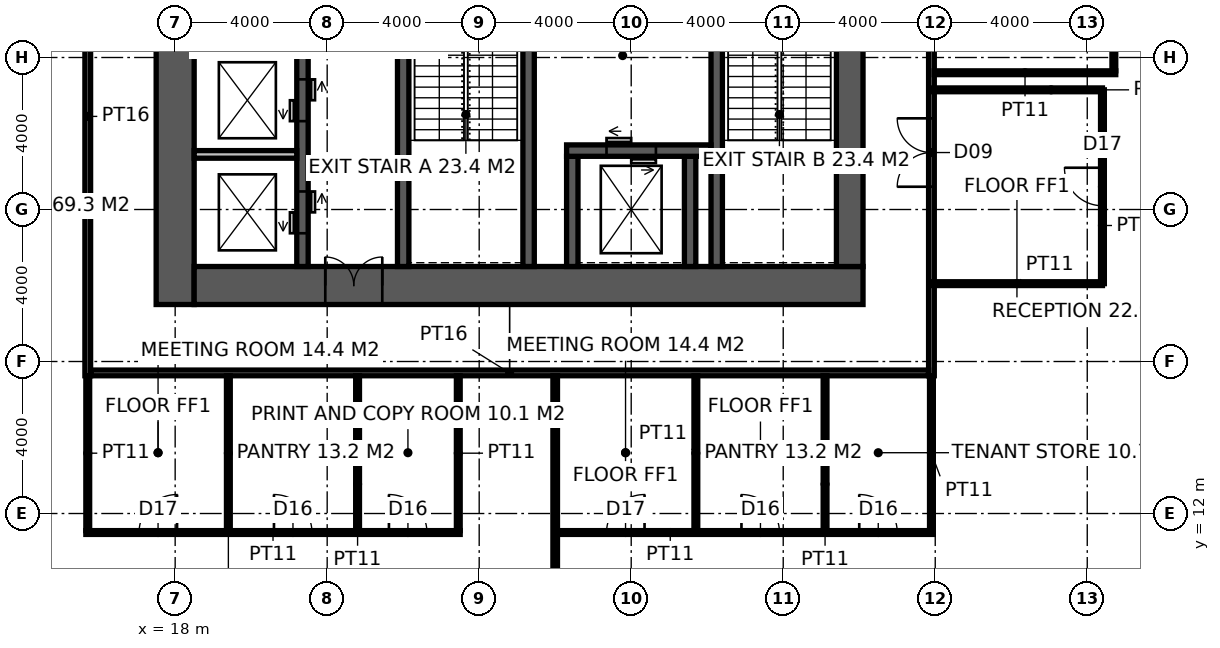
"""IFC4 building model, lengths in metres.
Left out: names, types, materials, properties, quantities, classifications, styles, units other than length and angle.
Written with IfcOpenShell. Run it as: python <this file> out.ifc"""

import sys

from ifc_helpers import new_model, si_unit, direction, frame, frame_2d, origin, place, context, subcontext, project, spatial, rectangle, extrude, element, fill, save


model = new_model("IFC4")
c1 = context("Model", 3, precision=1e-05, world=origin(), true_north=direction((0.0, 1.0)))
c2 = subcontext(c1, "Body", "Model", "MODEL_VIEW")
j1 = project(units=[si_unit("LENGTHUNIT", "METRE"), si_unit("PLANEANGLEUNIT", "RADIAN")], contexts=[c1])
p1 = place(None, origin())
s1 = spatial("IfcSite", under=j1, at=p1, CompositionType="ELEMENT")
p2 = place(p1, origin())
s2 = spatial("IfcBuilding", under=s1, at=p2, CompositionType="ELEMENT")
p3 = place(p2, frame((0.0, 0.0, 101.4)))
s3 = spatial("IfcBuildingStorey", under=s2, at=p3, CompositionType="ELEMENT", Elevation=101.4)
p4 = place(p3, frame((18.0, 17.5, -0.15), z_axis=(0.0, 0.0, 1.0), x_axis=(0.0, 1.0, 0.0)))
e1 = element("IfcWall", 1, at=p4, inside=s3, PredefinedType="SHEAR", context=c2, shape_type="SweptSolid", body=[
    extrude(rectangle(XDim=19.0, YDim=1.0, at=frame_2d((9.5, 0.0))), origin(), (0.0, 0.0, 1.0), 4.0),
])
p5 = place(p3, frame((18.5, 18.0, -0.15), z_axis=(0.0, 0.0, 1.0), x_axis=(1.0, 0.0, 0.0)))
e2 = element("IfcWall", 2, at=p5, inside=s3, PredefinedType="SHEAR", context=c2, shape_type="SweptSolid", body=[
    extrude(rectangle(XDim=17.6, YDim=1.0, at=frame_2d((8.8, 0.0))), origin(), (0.0, 0.0, 1.0), 4.0),
])
p6 = place(p5, frame((3.45, 0.0, 0.15)))
e3 = element("IfcOpeningElement", 3, at=p6, cuts=e2, PredefinedType="OPENING", context=c2, shape_type="SweptSolid", body=[
    extrude(rectangle(XDim=1.5, YDim=2.4, at=frame_2d((0.75, 1.2))), frame((0.0, 0.51, 0.0), z_axis=(0.0, -1.0, 0.0), x_axis=(1.0, 0.0, 0.0)), (0.0, 0.0, 1.0), 1.02),
])
p7 = place(p3, frame((35.75, 18.5, -0.15), z_axis=(0.0, 0.0, 1.0), x_axis=(0.0, 1.0, 0.0)))
e4 = element("IfcWall", 4, at=p7, inside=s3, PredefinedType="SHEAR", context=c2, shape_type="SweptSolid", body=[
    extrude(rectangle(XDim=17.0, YDim=0.7, at=frame_2d((8.5, 0.0))), origin(), (0.0, 0.0, 1.0), 4.0),
])
p8 = place(p7, frame((9.85, 0.0, 0.15)))
e5 = element("IfcOpeningElement", 5, at=p8, cuts=e4, PredefinedType="OPENING", context=c2, shape_type="SweptSolid", body=[
    extrude(rectangle(XDim=1.0, YDim=2.2, at=frame_2d((0.5, 1.1))), frame((0.0, 0.36, 0.0), z_axis=(0.0, -1.0, 0.0), x_axis=(1.0, 0.0, 0.0)), (0.0, 0.0, 1.0), 0.72),
])
p9 = place(p3, frame((24.0, 18.5, -0.15), z_axis=(0.0, 0.0, 1.0), x_axis=(0.0, 1.0, 0.0)))
e6 = element("IfcWall", 6, at=p9, inside=s3, PredefinedType="SHEAR", context=c2, shape_type="SweptSolid", body=[
    extrude(rectangle(XDim=17.0, YDim=0.3, at=frame_2d((8.5, 0.0))), origin(), (0.0, 0.0, 1.0), 4.0),
])
p10 = place(p9, frame((9.6, 0.0, 0.15)))
e7 = element("IfcOpeningElement", 7, at=p10, cuts=e6, PredefinedType="OPENING", context=c2, shape_type="SweptSolid", body=[
    extrude(rectangle(XDim=1.5, YDim=2.4, at=frame_2d((0.75, 1.2))), frame((0.0, 0.16, 0.0), z_axis=(0.0, -1.0, 0.0), x_axis=(1.0, 0.0, 0.0)), (0.0, 0.0, 1.0), 0.32),
])
p11 = place(p3, frame((27.3, 18.5, -0.15), z_axis=(0.0, 0.0, 1.0), x_axis=(0.0, 1.0, 0.0)))
e8 = element("IfcWall", 8, at=p11, inside=s3, PredefinedType="SHEAR", context=c2, shape_type="SweptSolid", body=[
    extrude(rectangle(XDim=7.9, YDim=0.3, at=frame_2d((3.95, 0.0))), origin(), (0.0, 0.0, 1.0), 4.0),
])
p12 = place(p11, frame((6.4, 0.0, 0.15)))
e9 = element("IfcOpeningElement", 9, at=p12, cuts=e8, PredefinedType="OPENING", context=c2, shape_type="SweptSolid", body=[
    extrude(rectangle(XDim=1.0, YDim=2.2, at=frame_2d((0.5, 1.1))), frame((0.0, 0.16, 0.0), z_axis=(0.0, -1.0, 0.0), x_axis=(1.0, 0.0, 0.0)), (0.0, 0.0, 1.0), 0.32),
])
p13 = place(p3, frame((32.25, 18.5, -0.15), z_axis=(0.0, 0.0, 1.0), x_axis=(0.0, 1.0, 0.0)))
e10 = element("IfcWall", 10, at=p13, inside=s3, PredefinedType="SHEAR", context=c2, shape_type="SweptSolid", body=[
    extrude(rectangle(XDim=7.9, YDim=0.3, at=frame_2d((3.95, 0.0))), origin(), (0.0, 0.0, 1.0), 4.0),
])
for number, where, z_axis, x_axis in (
    (11, (28.45, 18.5, -0.15), (0.0, 0.0, 1.0), (0.0, 1.0, 0.0)),
    (12, (31.55, 18.5, -0.15), (0.0, 0.0, 1.0), (0.0, 1.0, 0.0)),
):
    element("IfcWall", number, at=place(p3, frame(where, z_axis=z_axis, x_axis=x_axis)), inside=s3, PredefinedType="SHEAR", context=c2, shape_type="SweptSolid", body=[
        extrude(rectangle(XDim=2.9, YDim=0.3, at=frame_2d((1.45, 0.0))), origin(), (0.0, 0.0, 1.0), 4.0),
    ])
p14 = place(p3, frame((28.3, 21.55, -0.15), z_axis=(0.0, 0.0, 1.0), x_axis=(1.0, 0.0, 0.0)))
e13 = element("IfcWall", 13, at=p14, inside=s3, PredefinedType="SHEAR", context=c2, shape_type="SweptSolid", body=[
    extrude(rectangle(XDim=3.8, YDim=0.3, at=frame_2d((1.9, 0.0))), origin(), (0.0, 0.0, 1.0), 4.0),
])
p15 = place(p14, frame((1.05, 0.0, 0.15)))
e14 = element("IfcOpeningElement", 14, at=p15, cuts=e13, PredefinedType="OPENING", context=c2, shape_type="SweptSolid", body=[
    extrude(rectangle(XDim=1.3, YDim=2.4, at=frame_2d((0.65, 1.2))), frame((0.0, 0.16, 0.0), z_axis=(0.0, -1.0, 0.0), x_axis=(1.0, 0.0, 0.0)), (0.0, 0.0, 1.0), 0.32),
])
p16 = place(p3, frame((21.35, 18.5, -0.15), z_axis=(0.0, 0.0, 1.0), x_axis=(0.0, 1.0, 0.0)))
e15 = element("IfcWall", 15, at=p16, inside=s3, PredefinedType="SHEAR", context=c2, shape_type="SweptSolid", body=[
    extrude(rectangle(XDim=12.5, YDim=0.3, at=frame_2d((6.25, 0.0))), origin(), (0.0, 0.0, 1.0), 4.0),
])
p17 = place(p16, frame((0.875, 0.0, 0.15)))
e16 = element("IfcOpeningElement", 16, at=p17, cuts=e15, PredefinedType="OPENING", context=c2, shape_type="SweptSolid", body=[
    extrude(rectangle(XDim=1.1, YDim=2.2, at=frame_2d((0.55, 1.1))), frame((0.0, 0.16, 0.0), z_axis=(0.0, -1.0, 0.0), x_axis=(1.0, 0.0, 0.0)), (0.0, 0.0, 1.0), 0.32),
])
p18 = place(p16, frame((3.825, 0.0, 0.15)))
e17 = element("IfcOpeningElement", 17, at=p18, cuts=e15, PredefinedType="OPENING", context=c2, shape_type="SweptSolid", body=[
    extrude(rectangle(XDim=1.1, YDim=2.2, at=frame_2d((0.55, 1.1))), frame((0.0, 0.16, 0.0), z_axis=(0.0, -1.0, 0.0), x_axis=(1.0, 0.0, 0.0)), (0.0, 0.0, 1.0), 0.32),
])
p19 = place(p16, frame((6.675, 0.0, 0.15)))
e18 = element("IfcOpeningElement", 18, at=p19, cuts=e15, PredefinedType="OPENING", context=c2, shape_type="SweptSolid", body=[
    extrude(rectangle(XDim=1.1, YDim=2.2, at=frame_2d((0.55, 1.1))), frame((0.0, 0.16, 0.0), z_axis=(0.0, -1.0, 0.0), x_axis=(1.0, 0.0, 0.0)), (0.0, 0.0, 1.0), 0.32),
])
p20 = place(p16, frame((9.575, 0.0, 0.15)))
e19 = element("IfcOpeningElement", 19, at=p20, cuts=e15, PredefinedType="OPENING", context=c2, shape_type="SweptSolid", body=[
    extrude(rectangle(XDim=1.1, YDim=2.2, at=frame_2d((0.55, 1.1))), frame((0.0, 0.16, 0.0), z_axis=(0.0, -1.0, 0.0), x_axis=(1.0, 0.0, 0.0)), (0.0, 0.0, 1.0), 0.32),
])
p21 = place(p3, frame((18.5, 21.45, -0.15), z_axis=(0.0, 0.0, 1.0), x_axis=(1.0, 0.0, 0.0)))
e20 = element("IfcWall", 20, at=p21, inside=s3, PredefinedType="SOLIDWALL", context=c2, shape_type="SweptSolid", body=[
    extrude(rectangle(XDim=2.7, YDim=0.2, at=frame_2d((1.35, 0.0))), origin(), (0.0, 0.0, 1.0), 4.0),
])
p22 = place(p3, frame((15.7, 15.625, 0.0), z_axis=(0.0, 0.0, 1.0), x_axis=(0.0, 1.0, 0.0)))
e21 = element("IfcWall", 21, at=p22, inside=s3, PredefinedType="PARTITIONING", context=c2, shape_type="SweptSolid", body=[
    extrude(rectangle(XDim=22.75, YDim=0.15, at=frame_2d((11.375, 0.0))), origin(), (0.0, 0.0, 1.0), 3.85),
])
p23 = place(p22, frame((10.475, 0.0, 0.0)))
e22 = element("IfcOpeningElement", 22, at=p23, cuts=e21, PredefinedType="OPENING", context=c2, shape_type="SweptSolid", body=[
    extrude(rectangle(XDim=1.8, YDim=2.4, at=frame_2d((0.9, 1.2))), frame((0.0, 0.085, 0.0), z_axis=(0.0, -1.0, 0.0), x_axis=(1.0, 0.0, 0.0)), (0.0, 0.0, 1.0), 0.17),
])
p24 = place(p3, frame((37.9, 15.625, 0.0), z_axis=(0.0, 0.0, 1.0), x_axis=(0.0, 1.0, 0.0)))
e23 = element("IfcWall", 23, at=p24, inside=s3, PredefinedType="PARTITIONING", context=c2, shape_type="SweptSolid", body=[
    extrude(rectangle(XDim=22.75, YDim=0.15, at=frame_2d((11.375, 0.0))), origin(), (0.0, 0.0, 1.0), 2.65),
])
p25 = place(p24, frame((4.974, 0.0, 0.0)))
e24 = element("IfcOpeningElement", 24, at=p25, cuts=e23, PredefinedType="OPENING", context=c2, shape_type="SweptSolid", body=[
    extrude(rectangle(XDim=1.8, YDim=2.4, at=frame_2d((0.9, 1.2))), frame((0.0, 0.085, 0.0), z_axis=(0.0, -1.0, 0.0), x_axis=(1.0, 0.0, 0.0)), (0.0, 0.0, 1.0), 0.17),
])
p26 = place(p24, frame((16.226, 0.0, 0.0)))
e25 = element("IfcOpeningElement", 25, at=p26, cuts=e23, PredefinedType="OPENING", context=c2, shape_type="SweptSolid", body=[
    extrude(rectangle(XDim=1.8, YDim=2.4, at=frame_2d((0.9, 1.2))), frame((0.0, 0.085, 0.0), z_axis=(0.0, -1.0, 0.0), x_axis=(1.0, 0.0, 0.0)), (0.0, 0.0, 1.0), 0.17),
])
p27 = place(p3, frame((15.775, 15.7, 0.0), z_axis=(0.0, 0.0, 1.0), x_axis=(1.0, 0.0, 0.0)))
e26 = element("IfcWall", 26, at=p27, inside=s3, PredefinedType="PARTITIONING", context=c2, shape_type="SweptSolid", body=[
    extrude(rectangle(XDim=22.05, YDim=0.15, at=frame_2d((11.025, 0.0))), origin(), (0.0, 0.0, 1.0), 3.85),
])
p28 = place(p3, frame((28.0, 0.3, 0.0), z_axis=(0.0, 0.0, 1.0), x_axis=(0.0, 1.0, 0.0)))
e27 = element("IfcWall", 27, at=p28, inside=s3, PredefinedType="PARTITIONING", context=c2, shape_type="SweptSolid", body=[
    extrude(rectangle(XDim=15.325, YDim=0.12, at=frame_2d((7.663, 0.0))), origin(), (0.0, 0.0, 1.0), 3.85),
])
p29 = place(p3, frame((15.65, 11.5, 0.0), z_axis=(0.0, 0.0, 1.0), x_axis=(1.0, 0.0, 0.0)))
e28 = element("IfcWall", 28, at=p29, inside=s3, PredefinedType="PARTITIONING", context=c2, shape_type="SweptSolid", body=[
    extrude(rectangle(XDim=9.85, YDim=0.1, at=frame_2d((4.925, 0.0))), origin(), (0.0, 0.0, 1.0), 3.85),
])
p30 = place(p29, frame((1.4, 0.0, 0.0)))
e29 = element("IfcOpeningElement", 29, at=p30, cuts=e28, PredefinedType="OPENING", context=c2, shape_type="SweptSolid", body=[
    extrude(rectangle(XDim=1.0, YDim=2.2, at=frame_2d((0.5, 1.1))), frame((0.0, 0.06, 0.0), z_axis=(0.0, -1.0, 0.0), x_axis=(1.0, 0.0, 0.0)), (0.0, 0.0, 1.0), 0.12),
])
p31 = place(p29, frame((4.95, 0.0, 0.0)))
e30 = element("IfcOpeningElement", 30, at=p31, cuts=e28, PredefinedType="OPENING", context=c2, shape_type="SweptSolid", body=[
    extrude(rectangle(XDim=1.0, YDim=2.2, at=frame_2d((0.5, 1.1))), frame((0.0, 0.06, 0.0), z_axis=(0.0, -1.0, 0.0), x_axis=(1.0, 0.0, 0.0)), (0.0, 0.0, 1.0), 0.12),
])
p32 = place(p29, frame((7.975, 0.0, 0.0)))
e31 = element("IfcOpeningElement", 31, at=p32, cuts=e28, PredefinedType="OPENING", context=c2, shape_type="SweptSolid", body=[
    extrude(rectangle(XDim=1.0, YDim=2.2, at=frame_2d((0.5, 1.1))), frame((0.0, 0.06, 0.0), z_axis=(0.0, -1.0, 0.0), x_axis=(1.0, 0.0, 0.0)), (0.0, 0.0, 1.0), 0.12),
])
p33 = place(p3, frame((28.061, 11.5, 0.0), z_axis=(0.0, 0.0, 1.0), x_axis=(1.0, 0.0, 0.0)))
e32 = element("IfcWall", 32, at=p33, inside=s3, PredefinedType="PARTITIONING", context=c2, shape_type="SweptSolid", body=[
    extrude(rectangle(XDim=9.889, YDim=0.1, at=frame_2d((4.944, 0.0))), origin(), (0.0, 0.0, 1.0), 3.85),
])
p34 = place(p33, frame((1.29, 0.0, 0.0)))
e33 = element("IfcOpeningElement", 33, at=p34, cuts=e32, PredefinedType="OPENING", context=c2, shape_type="SweptSolid", body=[
    extrude(rectangle(XDim=1.0, YDim=2.2, at=frame_2d((0.5, 1.1))), frame((0.0, 0.06, 0.0), z_axis=(0.0, -1.0, 0.0), x_axis=(1.0, 0.0, 0.0)), (0.0, 0.0, 1.0), 0.12),
])
p35 = place(p33, frame((4.84, 0.0, 0.0)))
e34 = element("IfcOpeningElement", 34, at=p35, cuts=e32, PredefinedType="OPENING", context=c2, shape_type="SweptSolid", body=[
    extrude(rectangle(XDim=1.0, YDim=2.2, at=frame_2d((0.5, 1.1))), frame((0.0, 0.06, 0.0), z_axis=(0.0, -1.0, 0.0), x_axis=(1.0, 0.0, 0.0)), (0.0, 0.0, 1.0), 0.12),
])
p36 = place(p33, frame((7.939, 0.0, 0.0)))
e35 = element("IfcOpeningElement", 35, at=p36, cuts=e32, PredefinedType="OPENING", context=c2, shape_type="SweptSolid", body=[
    extrude(rectangle(XDim=1.0, YDim=2.2, at=frame_2d((0.5, 1.1))), frame((0.0, 0.06, 0.0), z_axis=(0.0, -1.0, 0.0), x_axis=(1.0, 0.0, 0.0)), (0.0, 0.0, 1.0), 0.12),
])
p37 = place(p3, frame((37.975, 23.599, 0.0), z_axis=(0.0, 0.0, 1.0), x_axis=(1.0, 0.0, 0.0)))
e36 = element("IfcWall", 36, at=p37, inside=s3, PredefinedType="PARTITIONING", context=c2, shape_type="SweptSolid", body=[
    extrude(rectangle(XDim=4.775, YDim=0.1, at=frame_2d((2.387, 0.0))), origin(), (0.0, 0.0, 1.0), 2.65),
])
for number, where, z_axis, x_axis in (
    (37, (15.7, 11.55, 0.0), (0.0, 0.0, 1.0), (0.0, 1.0, 0.0)),
    (38, (19.4, 11.55, 0.0), (0.0, 0.0, 1.0), (0.0, 1.0, 0.0)),
    (39, (22.8, 11.55, 0.0), (0.0, 0.0, 1.0), (0.0, 1.0, 0.0)),
):
    element("IfcWall", number, at=place(p3, frame(where, z_axis=z_axis, x_axis=x_axis)), inside=s3, PredefinedType="PARTITIONING", context=c2, shape_type="SweptSolid", body=[
        extrude(rectangle(XDim=4.075, YDim=0.1, at=frame_2d((2.038, 0.0))), origin(), (0.0, 0.0, 1.0), 3.85),
    ])
p38 = place(p3, frame((25.45, 11.55, 0.0), z_axis=(0.0, 0.0, 1.0), x_axis=(0.0, 1.0, 0.0)))
e40 = element("IfcWall", 40, at=p38, inside=s3, PredefinedType="PARTITIONING", context=c2, shape_type="SweptSolid", body=[
    extrude(rectangle(XDim=4.075, YDim=0.1, at=frame_2d((2.038, 0.0))), origin(), (0.0, 0.0, 1.0), 2.65),
])
for number, where, z_axis, x_axis in (
    (41, (31.701, 11.55, 0.0), (0.0, 0.0, 1.0), (0.0, 1.0, 0.0)),
    (42, (35.101, 11.55, 0.0), (0.0, 0.0, 1.0), (0.0, 1.0, 0.0)),
):
    element("IfcWall", number, at=place(p3, frame(where, z_axis=z_axis, x_axis=x_axis)), inside=s3, PredefinedType="PARTITIONING", context=c2, shape_type="SweptSolid", body=[
        extrude(rectangle(XDim=4.075, YDim=0.1, at=frame_2d((2.038, 0.0))), origin(), (0.0, 0.0, 1.0), 3.85),
    ])
p39 = place(p3, frame((37.9, 11.55, 0.0), z_axis=(0.0, 0.0, 1.0), x_axis=(0.0, 1.0, 0.0)))
e43 = element("IfcWall", 43, at=p39, inside=s3, PredefinedType="PARTITIONING", context=c2, shape_type="SweptSolid", body=[
    extrude(rectangle(XDim=4.075, YDim=0.1, at=frame_2d((2.038, 0.0))), origin(), (0.0, 0.0, 1.0), 2.65),
])
p40 = place(p3, frame((42.7, 23.649, 0.0), z_axis=(0.0, 0.0, 1.0), x_axis=(0.0, 1.0, 0.0)))
e44 = element("IfcWall", 44, at=p40, inside=s3, PredefinedType="PARTITIONING", context=c2, shape_type="SweptSolid", body=[
    extrude(rectangle(XDim=3.54, YDim=0.1, at=frame_2d((1.77, 0.0))), origin(), (0.0, 0.0, 1.0), 3.85),
])
p41 = place(p40, frame((1.275, 0.0, 0.0)))
e45 = element("IfcOpeningElement", 45, at=p41, cuts=e44, PredefinedType="OPENING", context=c2, shape_type="SweptSolid", body=[
    extrude(rectangle(XDim=1.0, YDim=2.2, at=frame_2d((0.5, 1.1))), frame((0.0, 0.06, 0.0), z_axis=(0.0, -1.0, 0.0), x_axis=(1.0, 0.0, 0.0)), (0.0, 0.0, 1.0), 0.12),
])
p42 = place(p3, frame((37.9, 18.049, 0.0), z_axis=(0.0, 0.0, 1.0), x_axis=(1.0, 0.0, 0.0)))
e46 = element("IfcWall", 46, at=p42, inside=s3, PredefinedType="PARTITIONING", context=c2, shape_type="SweptSolid", body=[
    extrude(rectangle(XDim=4.5, YDim=0.1, at=frame_2d((2.25, 0.0))), origin(), (0.0, 0.0, 1.0), 3.85),
])
p43 = place(p3, frame((42.4, 18.049, 0.0), z_axis=(0.0, 0.0, 1.0), x_axis=(0.0, 1.0, 0.0)))
e47 = element("IfcWall", 47, at=p43, inside=s3, PredefinedType="PARTITIONING", context=c2, shape_type="SweptSolid", body=[
    extrude(rectangle(XDim=5.1, YDim=0.1, at=frame_2d((2.55, 0.0))), origin(), (0.0, 0.0, 1.0), 2.65),
])
p44 = place(p43, frame((2.05, 0.0, 0.0)))
e48 = element("IfcOpeningElement", 48, at=p44, cuts=e47, PredefinedType="OPENING", context=c2, shape_type="SweptSolid", body=[
    extrude(rectangle(XDim=1.0, YDim=2.2, at=frame_2d((0.5, 1.1))), frame((0.0, 0.06, 0.0), z_axis=(0.0, -1.0, 0.0), x_axis=(1.0, 0.0, 0.0)), (0.0, 0.0, 1.0), 0.12),
])
p45 = place(p3, frame((42.4, 23.149, 0.0), z_axis=(0.0, 0.0, 1.0), x_axis=(-1.0, 0.0, 0.0)))
e49 = element("IfcWall", 49, at=p45, inside=s3, PredefinedType="PARTITIONING", context=c2, shape_type="SweptSolid", body=[
    extrude(rectangle(XDim=4.5, YDim=0.1, at=frame_2d((2.25, 0.0))), origin(), (0.0, 0.0, 1.0), 3.85),
])
p46 = place(p6, origin())
e50 = element("IfcDoor", 50, at=p46, inside=s3, OperationType="DOUBLE_DOOR_DOUBLE_SWING", PredefinedType="DOOR", context=c2, shape_type="SweptSolid", body=[
    extrude(rectangle(XDim=1.5, YDim=2.4, at=frame_2d((0.75, 1.2))), frame((0.0, 0.025, 0.0), z_axis=(0.0, -1.0, 0.0), x_axis=(1.0, 0.0, 0.0)), (0.0, 0.0, 1.0), 0.05),
])
fill(e3, e50)
p47 = place(p25, origin())
e51 = element("IfcDoor", 51, at=p47, inside=s3, OperationType="DOUBLE_DOOR_DOUBLE_SWING", PredefinedType="DOOR", context=c2, shape_type="SweptSolid", body=[
    extrude(rectangle(XDim=1.8, YDim=2.4, at=frame_2d((0.9, 1.2))), frame((0.0, 0.025, 0.0), z_axis=(0.0, -1.0, 0.0), x_axis=(1.0, 0.0, 0.0)), (0.0, 0.0, 1.0), 0.05),
])
fill(e24, e51)
p48 = place(p30, origin())
e52 = element("IfcDoor", 52, at=p48, inside=s3, OperationType="SINGLE_SWING_RIGHT", PredefinedType="DOOR", context=c2, shape_type="SweptSolid", body=[
    extrude(rectangle(XDim=1.0, YDim=2.2, at=frame_2d((0.5, 1.1))), frame((0.0, 0.025, 0.0), z_axis=(0.0, -1.0, 0.0), x_axis=(1.0, 0.0, 0.0)), (0.0, 0.0, 1.0), 0.05),
])
fill(e29, e52)
p49 = place(p31, origin())
e53 = element("IfcDoor", 53, at=p49, inside=s3, OperationType="SINGLE_SWING_LEFT", PredefinedType="DOOR", context=c2, shape_type="SweptSolid", body=[
    extrude(rectangle(XDim=1.0, YDim=2.2, at=frame_2d((0.5, 1.1))), frame((0.0, 0.025, 0.0), z_axis=(0.0, -1.0, 0.0), x_axis=(1.0, 0.0, 0.0)), (0.0, 0.0, 1.0), 0.05),
])
fill(e30, e53)
p50 = place(p32, origin())
e54 = element("IfcDoor", 54, at=p50, inside=s3, OperationType="SINGLE_SWING_LEFT", PredefinedType="DOOR", context=c2, shape_type="SweptSolid", body=[
    extrude(rectangle(XDim=1.0, YDim=2.2, at=frame_2d((0.5, 1.1))), frame((0.0, 0.025, 0.0), z_axis=(0.0, -1.0, 0.0), x_axis=(1.0, 0.0, 0.0)), (0.0, 0.0, 1.0), 0.05),
])
fill(e31, e54)
p51 = place(p34, origin())
e55 = element("IfcDoor", 55, at=p51, inside=s3, OperationType="SINGLE_SWING_RIGHT", PredefinedType="DOOR", context=c2, shape_type="SweptSolid", body=[
    extrude(rectangle(XDim=1.0, YDim=2.2, at=frame_2d((0.5, 1.1))), frame((0.0, 0.025, 0.0), z_axis=(0.0, -1.0, 0.0), x_axis=(1.0, 0.0, 0.0)), (0.0, 0.0, 1.0), 0.05),
])
fill(e33, e55)
p52 = place(p35, origin())
e56 = element("IfcDoor", 56, at=p52, inside=s3, OperationType="SINGLE_SWING_LEFT", PredefinedType="DOOR", context=c2, shape_type="SweptSolid", body=[
    extrude(rectangle(XDim=1.0, YDim=2.2, at=frame_2d((0.5, 1.1))), frame((0.0, 0.025, 0.0), z_axis=(0.0, -1.0, 0.0), x_axis=(1.0, 0.0, 0.0)), (0.0, 0.0, 1.0), 0.05),
])
fill(e34, e56)
p53 = place(p36, origin())
e57 = element("IfcDoor", 57, at=p53, inside=s3, OperationType="SINGLE_SWING_LEFT", PredefinedType="DOOR", context=c2, shape_type="SweptSolid", body=[
    extrude(rectangle(XDim=1.0, YDim=2.2, at=frame_2d((0.5, 1.1))), frame((0.0, 0.025, 0.0), z_axis=(0.0, -1.0, 0.0), x_axis=(1.0, 0.0, 0.0)), (0.0, 0.0, 1.0), 0.05),
])
fill(e35, e57)
p54 = place(p44, origin())
e58 = element("IfcDoor", 58, at=p54, inside=s3, OperationType="SINGLE_SWING_RIGHT", PredefinedType="DOOR", context=c2, shape_type="SweptSolid", body=[
    extrude(rectangle(XDim=1.0, YDim=2.2, at=frame_2d((0.5, 1.1))), frame((0.0, 0.025, 0.0), z_axis=(0.0, -1.0, 0.0), x_axis=(1.0, 0.0, 0.0)), (0.0, 0.0, 1.0), 0.05),
])
fill(e48, e58)
p55 = place(p15, origin())
e59 = element("IfcDoor", 59, at=p55, inside=s3, OperationType="DOUBLE_DOOR_SLIDING", PredefinedType="DOOR", context=c2, shape_type="SweptSolid", body=[
    extrude(rectangle(XDim=1.3, YDim=2.4, at=frame_2d((0.65, 1.2))), frame((0.0, 0.025, 0.0), z_axis=(0.0, -1.0, 0.0), x_axis=(1.0, 0.0, 0.0)), (0.0, 0.0, 1.0), 0.05),
])
fill(e14, e59)
p56 = place(p17, origin())
e60 = element("IfcDoor", 60, at=p56, inside=s3, OperationType="DOUBLE_DOOR_SLIDING", PredefinedType="DOOR", context=c2, shape_type="SweptSolid", body=[
    extrude(rectangle(XDim=1.1, YDim=2.2, at=frame_2d((0.55, 1.1))), frame((0.0, 0.025, 0.0), z_axis=(0.0, -1.0, 0.0), x_axis=(1.0, 0.0, 0.0)), (0.0, 0.0, 1.0), 0.05),
])
fill(e16, e60)
p57 = place(p18, origin())
e61 = element("IfcDoor", 61, at=p57, inside=s3, OperationType="DOUBLE_DOOR_SLIDING", PredefinedType="DOOR", context=c2, shape_type="SweptSolid", body=[
    extrude(rectangle(XDim=1.1, YDim=2.2, at=frame_2d((0.55, 1.1))), frame((0.0, 0.025, 0.0), z_axis=(0.0, -1.0, 0.0), x_axis=(1.0, 0.0, 0.0)), (0.0, 0.0, 1.0), 0.05),
])
fill(e17, e61)
save(model, sys.argv[1])
